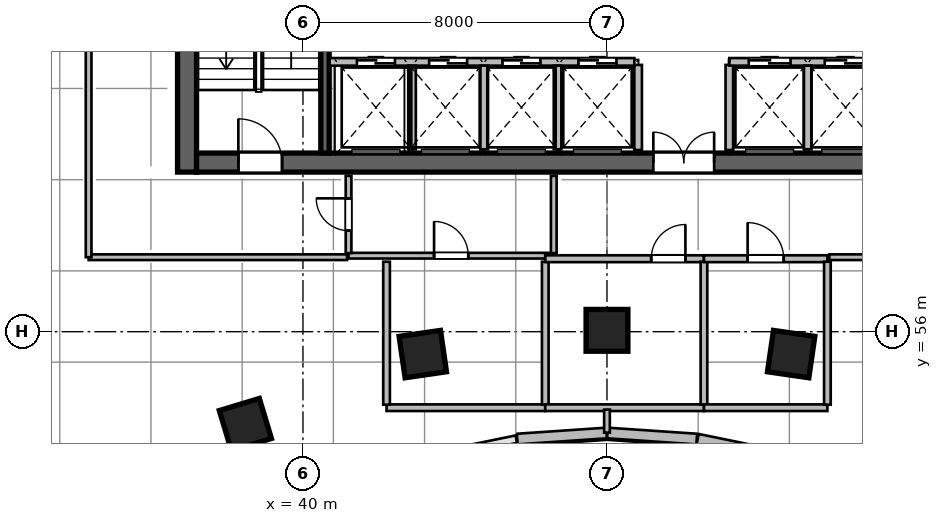
"""IFC4 building model, lengths in metres.
Left out: names, types, materials, properties, quantities, classifications, styles, units other than length and angle.
Written with IfcOpenShell. Run it as: python <this file> out.ifc"""

import sys

from ifc_helpers import new_model, si_unit, direction, frame, frame_2d, origin, origin_2d, place, context, subcontext, project, spatial, rectangle, extrude, source, transform, mapped, element, fill, save


model = new_model("IFC4")
c1 = context("Model", 3, precision=1e-05, world=origin(), true_north=direction((0.0, 1.0)))
c2 = subcontext(c1, "Body", "Model", "MODEL_VIEW")
j1 = project(units=[si_unit("LENGTHUNIT", "METRE"), si_unit("PLANEANGLEUNIT", "RADIAN")], contexts=[c1])
p1 = place(None, origin())
s1 = spatial("IfcSite", under=j1, at=p1, CompositionType="ELEMENT")
p2 = place(p1, origin())
s2 = spatial("IfcBuilding", under=s1, at=p2, CompositionType="ELEMENT")
p3 = place(p2, frame((0.0, 0.0, 91.2)))
s3 = spatial("IfcBuildingStorey", under=s2, at=p3, CompositionType="ELEMENT", Elevation=91.2)
m1 = source(origin(), c2, "Body", "SweptSolid", [
    extrude(rectangle(XDim=12.0, YDim=0.5, at=frame_2d((6.0, 0.0))), origin(), (0.0, 0.0, 1.0), 4.8),
])
p4 = place(p3, frame((36.95, 60.2, 0.0), z_axis=(0.0, 0.0, 1.0), x_axis=(0.0, 1.0, 0.0)))
e1 = element("IfcWall", 1, at=p4, inside=s3, PredefinedType="SHEAR", context=c2, shape_type="MappedRepresentation", body=[
    mapped(m1, transform((0.0, 0.0, 0.0), scale=1.0)),
])
m2 = source(origin(), c2, "Body", "SweptSolid", [
    extrude(rectangle(XDim=21.6, YDim=0.5, at=frame_2d((10.8, 0.0))), origin(), (0.0, 0.0, 1.0), 4.8),
])
p5 = place(p3, frame((37.2, 60.45, 0.0), z_axis=(0.0, 0.0, 1.0), x_axis=(1.0, 0.0, 0.0)))
e2 = element("IfcWall", 2, at=p5, inside=s3, PredefinedType="SHEAR", context=c2, shape_type="MappedRepresentation", body=[
    mapped(m2, transform((0.0, 0.0, 0.0), scale=1.0)),
])
p6 = place(p5, frame((1.1, 0.0, 0.0)))
e3 = element("IfcOpeningElement", 3, at=p6, cuts=e2, PredefinedType="OPENING", context=c2, shape_type="SweptSolid", body=[
    extrude(rectangle(XDim=1.15, YDim=2.15, at=frame_2d((0.575, 1.075))), frame((0.0, 0.26, 0.0), z_axis=(0.0, -1.0, 0.0), x_axis=(1.0, 0.0, 0.0)), (0.0, 0.0, 1.0), 0.52),
])
p7 = place(p5, frame((19.5, 0.0, 0.0)))
e4 = element("IfcOpeningElement", 4, at=p7, cuts=e2, PredefinedType="OPENING", context=c2, shape_type="SweptSolid", body=[
    extrude(rectangle(XDim=0.9, YDim=2.1, at=frame_2d((0.45, 1.05))), frame((0.0, 0.26, 0.0), z_axis=(0.0, -1.0, 0.0), x_axis=(1.0, 0.0, 0.0)), (0.0, 0.0, 1.0), 0.52),
])
p8 = place(p5, frame((12.02, 0.0, 0.0)))
e5 = element("IfcOpeningElement", 5, at=p8, cuts=e2, PredefinedType="OPENING", context=c2, shape_type="SweptSolid", body=[
    extrude(rectangle(XDim=1.6, YDim=2.15, at=frame_2d((0.8, 1.075))), frame((0.0, 0.26, 0.0), z_axis=(0.0, -1.0, 0.0), x_axis=(1.0, 0.0, 0.0)), (0.0, 0.0, 1.0), 0.52),
])
m3 = source(origin(), c2, "Body", "SweptSolid", [
    extrude(rectangle(XDim=11.0, YDim=0.22, at=frame_2d((5.5, 0.0))), origin(), (0.0, 0.0, 1.0), 4.8),
])
p9 = place(p3, frame((40.58, 60.7, 0.0), z_axis=(0.0, 0.0, 1.0), x_axis=(0.0, 1.0, 0.0)))
e6 = element("IfcWall", 6, at=p9, inside=s3, PredefinedType="SHEAR", context=c2, shape_type="MappedRepresentation", body=[
    mapped(m3, transform((0.0, 0.0, 0.0), scale=1.0)),
])
m4 = source(origin(), c2, "Body", "SweptSolid", [
    extrude(rectangle(XDim=1.1, YDim=1.1, at=origin_2d()), origin(), (0.0, 0.0, 1.0), 4.8),
])
for number, where, z_axis, x_axis in (
    (7, (38.485, 53.558, 0.0), (0.0, 0.0, 1.0), (-0.289, 0.957, 0.0)),
    (8, (43.154, 55.411, 0.0), (0.0, 0.0, 1.0), (-0.143, 0.99, 0.0)),
    (9, (48.0, 56.036, 0.0), (0.0, 0.0, 1.0), (0.0, 1.0, 0.0)),
    (10, (52.846, 55.411, 0.0), (0.0, 0.0, 1.0), (0.143, 0.99, 0.0)),
):
    element("IfcColumn", number, at=place(p3, frame(where, z_axis=z_axis, x_axis=x_axis)), inside=s3, PredefinedType="COLUMN", context=c2, shape_type="MappedRepresentation", body=[
        mapped(m4, transform((0.0, 0.0, 0.0), scale=1.0)),
    ])
m5 = source(origin(), c2, "Body", "SweptSolid", [
    extrude(rectangle(XDim=2.374, YDim=0.28, at=frame_2d((1.187, 0.0))), origin(), (0.0, 0.0, 1.0), 4.55),
])
p10 = place(p3, frame((52.711, 52.695, 0.0), z_axis=(0.0, 0.0, 1.0), x_axis=(-0.979619827472, 0.200860632341, 0.0)))
e11 = element("IfcWall", 11, at=p10, inside=s3, PredefinedType="SOLIDWALL", context=c2, shape_type="MappedRepresentation", body=[
    mapped(m5, transform((0.0, 0.0, 0.0), scale=1.0)),
])
m6 = source(origin(), c2, "Body", "SweptSolid", [
    extrude(rectangle(XDim=2.355, YDim=0.28, at=frame_2d((1.177, 0.0))), origin(), (0.0, 0.0, 1.0), 4.55),
])
for number, where, z_axis, x_axis in (
    (12, (50.362, 53.175, 0.0), (0.0, 0.0, 1.0), (-0.998, 0.068, 0.0)),
    (13, (47.988, 53.335, 0.0), (0.0, 0.0, 1.0), (-0.998, -0.068, 0.0)),
):
    element("IfcWall", number, at=place(p3, frame(where, z_axis=z_axis, x_axis=x_axis)), inside=s3, PredefinedType="SOLIDWALL", context=c2, shape_type="MappedRepresentation", body=[
        mapped(m6, transform((0.0, 0.0, 0.0), scale=1.0)),
    ])
m7 = source(origin(), c2, "Body", "SweptSolid", [
    extrude(rectangle(XDim=2.24, YDim=0.2, at=frame_2d((1.12, 0.0))), origin(), (0.0, 0.0, 1.0), 4.55),
])
for number, where, z_axis, x_axis in (
    (14, (48.82, 60.78, 0.0), (0.0, 0.0, 1.0), (0.0, 1.0, 0.0)),
    (15, (51.22, 60.78, 0.0), (0.0, 0.0, 1.0), (0.0, 1.0, 0.0)),
):
    element("IfcWall", number, at=place(p3, frame(where, z_axis=z_axis, x_axis=x_axis)), inside=s3, PredefinedType="SOLIDWALL", context=c2, shape_type="MappedRepresentation", body=[
        mapped(m7, transform((0.0, 0.0, 0.0), scale=1.0)),
    ])
m8 = source(origin(), c2, "Body", "SweptSolid", [
    extrude(rectangle(XDim=8.02, YDim=0.2, at=frame_2d((4.01, 0.0))), origin(), (0.0, 0.0, 1.0), 4.55),
])
p11 = place(p3, frame((40.7, 63.1, 0.0), z_axis=(0.0, 0.0, 1.0), x_axis=(1.0, 0.0, 0.0)))
e16 = element("IfcWall", 16, at=p11, inside=s3, PredefinedType="SOLIDWALL", context=c2, shape_type="MappedRepresentation", body=[
    mapped(m8, transform((0.0, 0.0, 0.0), scale=1.0)),
])
p12 = place(p11, frame((0.72, 0.0, 0.0)))
e17 = element("IfcOpeningElement", 17, at=p12, cuts=e16, PredefinedType="OPENING", context=c2, shape_type="SweptSolid", body=[
    extrude(rectangle(XDim=1.0, YDim=2.15, at=frame_2d((0.5, 1.075))), frame((0.0, 0.11, 0.0), z_axis=(0.0, -1.0, 0.0), x_axis=(1.0, 0.0, 0.0)), (0.0, 0.0, 1.0), 0.22),
])
p13 = place(p11, frame((2.62, 0.0, 0.0)))
e18 = element("IfcOpeningElement", 18, at=p13, cuts=e16, PredefinedType="OPENING", context=c2, shape_type="SweptSolid", body=[
    extrude(rectangle(XDim=1.0, YDim=2.15, at=frame_2d((0.5, 1.075))), frame((0.0, 0.11, 0.0), z_axis=(0.0, -1.0, 0.0), x_axis=(1.0, 0.0, 0.0)), (0.0, 0.0, 1.0), 0.22),
])
p14 = place(p11, frame((4.55, 0.0, 0.0)))
e19 = element("IfcOpeningElement", 19, at=p14, cuts=e16, PredefinedType="OPENING", context=c2, shape_type="SweptSolid", body=[
    extrude(rectangle(XDim=1.0, YDim=2.15, at=frame_2d((0.5, 1.075))), frame((0.0, 0.11, 0.0), z_axis=(0.0, -1.0, 0.0), x_axis=(1.0, 0.0, 0.0)), (0.0, 0.0, 1.0), 0.22),
])
p15 = place(p11, frame((6.55, 0.0, 0.0)))
e20 = element("IfcOpeningElement", 20, at=p15, cuts=e16, PredefinedType="OPENING", context=c2, shape_type="SweptSolid", body=[
    extrude(rectangle(XDim=1.0, YDim=2.15, at=frame_2d((0.5, 1.075))), frame((0.0, 0.11, 0.0), z_axis=(0.0, -1.0, 0.0), x_axis=(1.0, 0.0, 0.0)), (0.0, 0.0, 1.0), 0.22),
])
m9 = source(origin(), c2, "Body", "SweptSolid", [
    extrude(rectangle(XDim=4.1, YDim=0.2, at=frame_2d((2.05, 0.0))), origin(), (0.0, 0.0, 1.0), 4.55),
])
p16 = place(p3, frame((51.22, 63.1, 0.0), z_axis=(0.0, 0.0, 1.0), x_axis=(1.0, 0.0, 0.0)))
e21 = element("IfcWall", 21, at=p16, inside=s3, PredefinedType="SOLIDWALL", context=c2, shape_type="MappedRepresentation", body=[
    mapped(m9, transform((0.0, 0.0, 0.0), scale=1.0)),
])
p17 = place(p16, frame((0.51, 0.0, 0.0)))
e22 = element("IfcOpeningElement", 22, at=p17, cuts=e21, PredefinedType="OPENING", context=c2, shape_type="SweptSolid", body=[
    extrude(rectangle(XDim=1.1, YDim=2.15, at=frame_2d((0.55, 1.075))), frame((0.0, 0.11, 0.0), z_axis=(0.0, -1.0, 0.0), x_axis=(1.0, 0.0, 0.0)), (0.0, 0.0, 1.0), 0.22),
])
p18 = place(p16, frame((2.51, 0.0, 0.0)))
e23 = element("IfcOpeningElement", 23, at=p18, cuts=e21, PredefinedType="OPENING", context=c2, shape_type="SweptSolid", body=[
    extrude(rectangle(XDim=1.1, YDim=2.15, at=frame_2d((0.55, 1.075))), frame((0.0, 0.11, 0.0), z_axis=(0.0, -1.0, 0.0), x_axis=(1.0, 0.0, 0.0)), (0.0, 0.0, 1.0), 0.22),
])
m10 = source(origin(), c2, "Body", "SweptSolid", [
    extrude(rectangle(XDim=2.2, YDim=0.2, at=frame_2d((1.1, 0.0))), origin(), (0.0, 0.0, 1.0), 4.55),
])
for number, where, z_axis, x_axis in (
    (24, (42.87, 60.8, 0.0), (0.0, 0.0, 1.0), (0.0, 1.0, 0.0)),
    (25, (44.77, 60.8, 0.0), (0.0, 0.0, 1.0), (0.0, 1.0, 0.0)),
    (26, (46.7, 60.8, 0.0), (0.0, 0.0, 1.0), (0.0, 1.0, 0.0)),
    (27, (53.28, 60.8, 0.0), (0.0, 0.0, 1.0), (0.0, 1.0, 0.0)),
):
    element("IfcWall", number, at=place(p3, frame(where, z_axis=z_axis, x_axis=x_axis)), inside=s3, PredefinedType="SOLIDWALL", context=c2, shape_type="MappedRepresentation", body=[
        mapped(m10, transform((0.0, 0.0, 0.0), scale=1.0)),
    ])
m11 = source(origin(), c2, "Body", "SweptSolid", [
    extrude(rectangle(XDim=5.4, YDim=0.15, at=frame_2d((2.7, 0.0))), origin(), (0.0, 0.0, 1.0), 4.117),
])
p19 = place(p3, frame((41.2, 58.0, 0.0), z_axis=(0.0, 0.0, 1.0), x_axis=(1.0, 0.0, 0.0)))
e28 = element("IfcWall", 28, at=p19, inside=s3, PredefinedType="PARTITIONING", context=c2, shape_type="MappedRepresentation", body=[
    mapped(m11, transform((0.0, 0.0, 0.0), scale=1.0)),
])
p20 = place(p19, frame((2.25, 0.0, 0.0)))
e29 = element("IfcOpeningElement", 29, at=p20, cuts=e28, PredefinedType="OPENING", context=c2, shape_type="SweptSolid", body=[
    extrude(rectangle(XDim=0.9, YDim=2.08, at=frame_2d((0.45, 1.04))), frame((0.0, 0.085, 0.0), z_axis=(0.0, -1.0, 0.0), x_axis=(1.0, 0.0, 0.0)), (0.0, 0.0, 1.0), 0.17),
])
m12 = source(origin(), c2, "Body", "SweptSolid", [
    extrude(rectangle(XDim=2.033, YDim=0.15, at=frame_2d((1.016, 0.0))), origin(), (0.0, 0.0, 1.0), 4.55),
])
p21 = place(p3, frame((41.2, 58.067, 0.0), z_axis=(0.0, 0.0, 1.0), x_axis=(0.0, 1.0, 0.0)))
e30 = element("IfcWall", 30, at=p21, inside=s3, PredefinedType="PARTITIONING", context=c2, shape_type="MappedRepresentation", body=[
    mapped(m12, transform((0.0, 0.0, 0.0), scale=1.0)),
])
p22 = place(p21, frame((0.591, 0.0, 0.0)))
e31 = element("IfcOpeningElement", 31, at=p22, cuts=e30, PredefinedType="OPENING", context=c2, shape_type="SweptSolid", body=[
    extrude(rectangle(XDim=0.85, YDim=2.1, at=frame_2d((0.425, 1.05))), frame((0.0, 0.085, 0.0), z_axis=(0.0, -1.0, 0.0), x_axis=(1.0, 0.0, 0.0)), (0.0, 0.0, 1.0), 0.17),
])
p23 = place(p3, frame((46.6, 58.067, 0.0), z_axis=(0.0, 0.0, 1.0), x_axis=(0.0, 1.0, 0.0)))
e32 = element("IfcWall", 32, at=p23, inside=s3, PredefinedType="PARTITIONING", context=c2, shape_type="MappedRepresentation", body=[
    mapped(m12, transform((0.0, 0.0, 0.0), scale=1.0)),
])
m13 = source(origin(), c2, "Body", "SweptSolid", [
    extrude(rectangle(XDim=4.176, YDim=0.175, at=frame_2d((2.088, 0.0))), origin(), (0.0, 0.0, 1.0), 4.55),
])
p24 = place(p3, frame((42.2, 54.0, 0.0), z_axis=(0.0, 0.0, 1.0), x_axis=(1.0, 0.0, 0.0)))
e33 = element("IfcWall", 33, at=p24, inside=s3, PredefinedType="PARTITIONING", context=c2, shape_type="MappedRepresentation", body=[
    mapped(m13, transform((0.0, 0.0, 0.0), scale=1.0)),
])
m14 = source(origin(), c2, "Body", "SweptSolid", [
    extrude(rectangle(XDim=3.763, YDim=0.175, at=frame_2d((1.881, 0.0))), origin(), (0.0, 0.0, 1.0), 4.55),
])
for number, where, z_axis, x_axis in (
    (34, (42.2, 54.079, 0.0), (0.0, 0.0, 1.0), (0.0, 1.0, 0.0)),
    (35, (46.376, 54.079, 0.0), (0.0, 0.0, 1.0), (0.0, 1.0, 0.0)),
):
    element("IfcWall", number, at=place(p3, frame(where, z_axis=z_axis, x_axis=x_axis)), inside=s3, PredefinedType="PARTITIONING", context=c2, shape_type="MappedRepresentation", body=[
        mapped(m14, transform((0.0, 0.0, 0.0), scale=1.0)),
    ])
p25 = place(p3, frame((46.376, 54.0, 0.0), z_axis=(0.0, 0.0, 1.0), x_axis=(1.0, 0.0, 0.0)))
e36 = element("IfcWall", 36, at=p25, inside=s3, PredefinedType="PARTITIONING", context=c2, shape_type="MappedRepresentation", body=[
    mapped(m13, transform((0.0, 0.0, 0.0), scale=1.0)),
])
m15 = source(origin(), c2, "Body", "SweptSolid", [
    extrude(rectangle(XDim=4.176, YDim=0.18, at=frame_2d((2.088, 0.0))), origin(), (0.0, 0.0, 1.0), 4.55),
])
p26 = place(p3, frame((46.376, 57.92, 0.0), z_axis=(0.0, 0.0, 1.0), x_axis=(1.0, 0.0, 0.0)))
e37 = element("IfcWall", 37, at=p26, inside=s3, PredefinedType="PLUMBINGWALL", context=c2, shape_type="MappedRepresentation", body=[
    mapped(m15, transform((0.0, 0.0, 0.0), scale=1.0)),
])
p27 = place(p26, frame((2.788, 0.0, 0.0)))
e38 = element("IfcOpeningElement", 38, at=p27, cuts=e37, PredefinedType="OPENING", context=c2, shape_type="SweptSolid", body=[
    extrude(rectangle(XDim=0.9, YDim=2.08, at=frame_2d((0.45, 1.04))), frame((0.0, 0.1, 0.0), z_axis=(0.0, -1.0, 0.0), x_axis=(1.0, 0.0, 0.0)), (0.0, 0.0, 1.0), 0.2),
])
p28 = place(p3, frame((50.552, 54.079, 0.0), z_axis=(0.0, 0.0, 1.0), x_axis=(0.0, 1.0, 0.0)))
e39 = element("IfcWall", 39, at=p28, inside=s3, PredefinedType="PARTITIONING", context=c2, shape_type="MappedRepresentation", body=[
    mapped(m14, transform((0.0, 0.0, 0.0), scale=1.0)),
])
m16 = source(origin(), c2, "Body", "SweptSolid", [
    extrude(rectangle(XDim=3.248, YDim=0.175, at=frame_2d((1.624, 0.0))), origin(), (0.0, 0.0, 1.0), 4.55),
])
p29 = place(p3, frame((50.552, 54.0, 0.0), z_axis=(0.0, 0.0, 1.0), x_axis=(1.0, 0.0, 0.0)))
e40 = element("IfcWall", 40, at=p29, inside=s3, PredefinedType="PARTITIONING", context=c2, shape_type="MappedRepresentation", body=[
    mapped(m16, transform((0.0, 0.0, 0.0), scale=1.0)),
])
m17 = source(origin(), c2, "Body", "SweptSolid", [
    extrude(rectangle(XDim=3.248, YDim=0.18, at=frame_2d((1.624, 0.0))), origin(), (0.0, 0.0, 1.0), 4.55),
])
p30 = place(p3, frame((50.552, 57.92, 0.0), z_axis=(0.0, 0.0, 1.0), x_axis=(1.0, 0.0, 0.0)))
e41 = element("IfcWall", 41, at=p30, inside=s3, PredefinedType="PLUMBINGWALL", context=c2, shape_type="MappedRepresentation", body=[
    mapped(m17, transform((0.0, 0.0, 0.0), scale=1.0)),
])
p31 = place(p30, frame((1.149, 0.0, 0.0)))
e42 = element("IfcOpeningElement", 42, at=p31, cuts=e41, PredefinedType="OPENING", context=c2, shape_type="SweptSolid", body=[
    extrude(rectangle(XDim=0.95, YDim=2.12, at=frame_2d((0.475, 1.06))), frame((0.0, 0.1, 0.0), z_axis=(0.0, -1.0, 0.0), x_axis=(1.0, 0.0, 0.0)), (0.0, 0.0, 1.0), 0.2),
])
p32 = place(p3, frame((53.8, 54.079, 0.0), z_axis=(0.0, 0.0, 1.0), x_axis=(0.0, 1.0, 0.0)))
e43 = element("IfcWall", 43, at=p32, inside=s3, PredefinedType="PARTITIONING", context=c2, shape_type="MappedRepresentation", body=[
    mapped(m14, transform((0.0, 0.0, 0.0), scale=1.0)),
])
m18 = source(origin(), c2, "Body", "SweptSolid", [
    extrude(rectangle(XDim=0.605, YDim=0.15, at=frame_2d((0.303, 0.0))), origin(), (0.0, 0.0, 1.0), 4.55),
])
p33 = place(p3, frame((48.0, 53.344, 0.0), z_axis=(0.0, 0.0, 1.0), x_axis=(0.0, 1.0, 0.0)))
e44 = element("IfcWall", 44, at=p33, inside=s3, PredefinedType="PARTITIONING", context=c2, shape_type="MappedRepresentation", body=[
    mapped(m18, transform((0.0, 0.0, 0.0), scale=1.0)),
])
m19 = source(origin(), c2, "Body", "SweptSolid", [
    extrude(rectangle(XDim=6.8, YDim=0.15, at=frame_2d((3.4, 0.0))), origin(), (0.0, 0.0, 1.0), 4.55),
])
p34 = place(p3, frame((34.36, 57.96, 0.0), z_axis=(0.0, 0.0, 1.0), x_axis=(1.0, 0.0, 0.0)))
e45 = element("IfcWall", 45, at=p34, inside=s3, PredefinedType="PARTITIONING", context=c2, shape_type="MappedRepresentation", body=[
    mapped(m19, transform((0.0, 0.0, 0.0), scale=1.0)),
])
m20 = source(origin(), c2, "Body", "SweptSolid", [
    extrude(rectangle(XDim=18.067, YDim=0.15, at=frame_2d((9.034, 0.0))), origin(), (0.0, 0.0, 1.0), 4.55),
])
p35 = place(p3, frame((34.36, 57.96, 0.0), z_axis=(0.0, 0.0, 1.0), x_axis=(0.0, 1.0, 0.0)))
e46 = element("IfcWall", 46, at=p35, inside=s3, PredefinedType="PARTITIONING", context=c2, shape_type="MappedRepresentation", body=[
    mapped(m20, transform((0.0, 0.0, 0.0), scale=1.0)),
])
p36 = place(p35, frame((8.333, 0.0, 0.0)))
e47 = element("IfcOpeningElement", 47, at=p36, cuts=e46, PredefinedType="OPENING", context=c2, shape_type="SweptSolid", body=[
    extrude(rectangle(XDim=1.4, YDim=2.15, at=frame_2d((0.7, 1.075))), frame((0.0, 0.085, 0.0), z_axis=(0.0, -1.0, 0.0), x_axis=(1.0, 0.0, 0.0)), (0.0, 0.0, 1.0), 0.17),
])
m21 = source(origin(), c2, "Body", "SweptSolid", [
    extrude(rectangle(XDim=7.79, YDim=0.15, at=frame_2d((3.895, 0.0))), origin(), (0.0, 0.0, 1.0), 4.117),
])
p37 = place(p3, frame((53.85, 57.96, 0.0), z_axis=(0.0, 0.0, 1.0), x_axis=(1.0, 0.0, 0.0)))
e48 = element("IfcWall", 48, at=p37, inside=s3, PredefinedType="PARTITIONING", context=c2, shape_type="MappedRepresentation", body=[
    mapped(m21, transform((0.0, 0.0, 0.0), scale=1.0)),
])
p38 = place(p37, frame((3.195, 0.0, 0.0)))
e49 = element("IfcOpeningElement", 49, at=p38, cuts=e48, PredefinedType="OPENING", context=c2, shape_type="SweptSolid", body=[
    extrude(rectangle(XDim=1.4, YDim=2.15, at=frame_2d((0.7, 1.075))), frame((0.0, 0.085, 0.0), z_axis=(0.0, -1.0, 0.0), x_axis=(1.0, 0.0, 0.0)), (0.0, 0.0, 1.0), 0.17),
])
m22 = source(origin(), c2, "Body", "SweptSolid", [
    extrude(rectangle(XDim=1.15, YDim=2.15, at=frame_2d((0.575, 1.075))), frame((0.0, 0.025, 0.0), z_axis=(0.0, -1.0, 0.0), x_axis=(1.0, 0.0, 0.0)), (0.0, 0.0, 1.0), 0.05),
])
p39 = place(p6, origin())
e50 = element("IfcDoor", 50, at=p39, inside=s3, OperationType="SINGLE_SWING_LEFT", PredefinedType="DOOR", context=c2, shape_type="MappedRepresentation", body=[
    mapped(m22, transform((0.0, 0.0, 0.0), scale=1.0)),
])
fill(e3, e50)
m23 = source(origin(), c2, "Body", "SweptSolid", [
    extrude(rectangle(XDim=1.6, YDim=2.15, at=frame_2d((0.8, 1.075))), frame((0.0, 0.025, 0.0), z_axis=(0.0, -1.0, 0.0), x_axis=(1.0, 0.0, 0.0)), (0.0, 0.0, 1.0), 0.05),
])
p40 = place(p8, origin())
e51 = element("IfcDoor", 51, at=p40, inside=s3, OperationType="DOUBLE_DOOR_SINGLE_SWING", PredefinedType="DOOR", context=c2, shape_type="MappedRepresentation", body=[
    mapped(m23, transform((0.0, 0.0, 0.0), scale=1.0)),
])
fill(e5, e51)
m24 = source(origin(), c2, "Body", "SweptSolid", [
    extrude(rectangle(XDim=1.0, YDim=2.15, at=frame_2d((0.5, 1.075))), frame((0.0, 0.025, 0.0), z_axis=(0.0, -1.0, 0.0), x_axis=(1.0, 0.0, 0.0)), (0.0, 0.0, 1.0), 0.05),
])
p41 = place(p12, origin())
e52 = element("IfcDoor", 52, at=p41, inside=s3, OperationType="DOUBLE_DOOR_SLIDING", PredefinedType="DOOR", context=c2, shape_type="MappedRepresentation", body=[
    mapped(m24, transform((0.0, 0.0, 0.0), scale=1.0)),
])
fill(e17, e52)
p42 = place(p13, origin())
e53 = element("IfcDoor", 53, at=p42, inside=s3, OperationType="DOUBLE_DOOR_SLIDING", PredefinedType="DOOR", context=c2, shape_type="MappedRepresentation", body=[
    mapped(m24, transform((0.0, 0.0, 0.0), scale=1.0)),
])
fill(e18, e53)
p43 = place(p14, origin())
e54 = element("IfcDoor", 54, at=p43, inside=s3, OperationType="DOUBLE_DOOR_SLIDING", PredefinedType="DOOR", context=c2, shape_type="MappedRepresentation", body=[
    mapped(m24, transform((0.0, 0.0, 0.0), scale=1.0)),
])
fill(e19, e54)
p44 = place(p15, origin())
e55 = element("IfcDoor", 55, at=p44, inside=s3, OperationType="DOUBLE_DOOR_SLIDING", PredefinedType="DOOR", context=c2, shape_type="MappedRepresentation", body=[
    mapped(m24, transform((0.0, 0.0, 0.0), scale=1.0)),
])
fill(e20, e55)
m25 = source(origin(), c2, "Body", "SweptSolid", [
    extrude(rectangle(XDim=1.1, YDim=2.15, at=frame_2d((0.55, 1.075))), frame((0.0, 0.025, 0.0), z_axis=(0.0, -1.0, 0.0), x_axis=(1.0, 0.0, 0.0)), (0.0, 0.0, 1.0), 0.05),
])
p45 = place(p17, origin())
e56 = element("IfcDoor", 56, at=p45, inside=s3, OperationType="DOUBLE_DOOR_SLIDING", PredefinedType="DOOR", context=c2, shape_type="MappedRepresentation", body=[
    mapped(m25, transform((0.0, 0.0, 0.0), scale=1.0)),
])
fill(e22, e56)
p46 = place(p18, origin())
e57 = element("IfcDoor", 57, at=p46, inside=s3, OperationType="DOUBLE_DOOR_SLIDING", PredefinedType="DOOR", context=c2, shape_type="MappedRepresentation", body=[
    mapped(m25, transform((0.0, 0.0, 0.0), scale=1.0)),
])
fill(e23, e57)
m26 = source(origin(), c2, "Body", "SweptSolid", [
    extrude(rectangle(XDim=0.85, YDim=2.1, at=frame_2d((0.425, 1.05))), frame((0.0, 0.025, 0.0), z_axis=(0.0, -1.0, 0.0), x_axis=(1.0, 0.0, 0.0)), (0.0, 0.0, 1.0), 0.05),
])
p47 = place(p22, origin())
e58 = element("IfcDoor", 58, at=p47, inside=s3, OperationType="SINGLE_SWING_RIGHT", PredefinedType="DOOR", context=c2, shape_type="MappedRepresentation", body=[
    mapped(m26, transform((0.0, 0.0, 0.0), scale=1.0)),
])
fill(e31, e58)
m27 = source(origin(), c2, "Body", "SweptSolid", [
    extrude(rectangle(XDim=0.9, YDim=2.08, at=frame_2d((0.45, 1.04))), frame((0.0, 0.025, 0.0), z_axis=(0.0, -1.0, 0.0), x_axis=(1.0, 0.0, 0.0)), (0.0, 0.0, 1.0), 0.05),
])
p48 = place(p20, origin())
e59 = element("IfcDoor", 59, at=p48, inside=s3, OperationType="SINGLE_SWING_LEFT", PredefinedType="DOOR", context=c2, shape_type="MappedRepresentation", body=[
    mapped(m27, transform((0.0, 0.0, 0.0), scale=1.0)),
])
fill(e29, e59)
p49 = place(p27, origin())
e60 = element("IfcDoor", 60, at=p49, inside=s3, OperationType="SINGLE_SWING_RIGHT", PredefinedType="DOOR", context=c2, shape_type="MappedRepresentation", body=[
    mapped(m27, transform((0.0, 0.0, 0.0), scale=1.0)),
])
fill(e38, e60)
m28 = source(origin(), c2, "Body", "SweptSolid", [
    extrude(rectangle(XDim=0.95, YDim=2.12, at=frame_2d((0.475, 1.06))), frame((0.0, 0.025, 0.0), z_axis=(0.0, -1.0, 0.0), x_axis=(1.0, 0.0, 0.0)), (0.0, 0.0, 1.0), 0.05),
])
p50 = place(p31, origin())
e61 = element("IfcDoor", 61, at=p50, inside=s3, OperationType="SINGLE_SWING_LEFT", PredefinedType="DOOR", context=c2, shape_type="MappedRepresentation", body=[
    mapped(m28, transform((0.0, 0.0, 0.0), scale=1.0)),
])
fill(e42, e61)
save(model, sys.argv[1])
